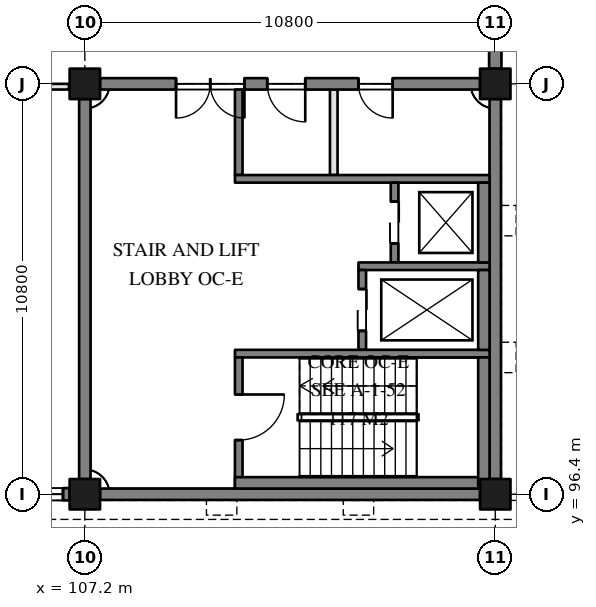
"""IFC4 building model, lengths in metres.
Left out: names, types, materials, properties, quantities, classifications, styles, units other than length and angle.
Written with IfcOpenShell. Run it as: python <this file> out.ifc"""

import sys

from ifc_helpers import new_model, si_unit, direction, frame, frame_2d, origin, origin_2d, place, context, subcontext, project, spatial, rectangle, extrude, element, fill, save


model = new_model("IFC4")
c1 = context("Model", 3, precision=1e-05, world=origin(), true_north=direction((0.0, 1.0)))
c2 = subcontext(c1, "Body", "Model", "MODEL_VIEW")
j1 = project(units=[si_unit("LENGTHUNIT", "METRE"), si_unit("PLANEANGLEUNIT", "RADIAN")], contexts=[c1])
p1 = place(None, origin())
s1 = spatial("IfcSite", under=j1, at=p1, CompositionType="ELEMENT")
p2 = place(p1, origin())
s2 = spatial("IfcBuilding", under=s1, at=p2, CompositionType="ELEMENT")
p3 = place(p2, frame((0.0, 0.0, 12.6)))
s3 = spatial("IfcBuildingStorey", under=s2, at=p3, CompositionType="ELEMENT", Elevation=12.6)
for number, where, z_axis, x_axis in (
    (1, (107.2, 96.4, 0.0), (0.0, 0.0, 1.0), (1.0, 0.0, 0.0)),
    (2, (107.2, 107.2, 0.0), (0.0, 0.0, 1.0), (1.0, 0.0, 0.0)),
    (3, (118.0, 96.4, 0.0), (0.0, 0.0, 1.0), (1.0, 0.0, 0.0)),
    (4, (118.0, 107.2, 0.0), (0.0, 0.0, 1.0), (1.0, 0.0, 0.0)),
):
    element("IfcColumn", number, at=place(p3, frame(where, z_axis=z_axis, x_axis=x_axis)), inside=s3, PredefinedType="COLUMN", context=c2, shape_type="SweptSolid", body=[
        extrude(rectangle(XDim=0.8, YDim=0.8, at=origin_2d()), origin(), (0.0, 0.0, 1.0), 3.9),
    ])
for number, where, z_axis, x_axis in (
    (5, (107.6, 96.4, 0.0), (0.0, 0.0, 1.0), (1.0, 0.0, 0.0)),
    (6, (118.0, 96.8, 0.0), (0.0, 0.0, 1.0), (0.0, 1.0, 0.0)),
):
    element("IfcWall", number, at=place(p3, frame(where, z_axis=z_axis, x_axis=x_axis)), inside=s3, PredefinedType="SOLIDWALL", context=c2, shape_type="SweptSolid", body=[
        extrude(rectangle(XDim=10.0, YDim=0.3, at=frame_2d((5.0, 0.0))), origin(), (0.0, 0.0, 1.0), 3.9),
    ])
p4 = place(p3, frame((117.6, 107.2, 0.0), z_axis=(0.0, 0.0, 1.0), x_axis=(-1.0, 0.0, 0.0)))
e7 = element("IfcWall", 7, at=p4, inside=s3, PredefinedType="SOLIDWALL", context=c2, shape_type="SweptSolid", body=[
    extrude(rectangle(XDim=10.0, YDim=0.3, at=frame_2d((5.0, 0.0))), origin(), (0.0, 0.0, 1.0), 3.9),
])
p5 = place(p4, frame((6.2, 0.0, 0.0)))
e8 = element("IfcOpeningElement", 8, at=p5, cuts=e7, PredefinedType="OPENING", context=c2, shape_type="SweptSolid", body=[
    extrude(rectangle(XDim=1.8, YDim=2.1, at=frame_2d((0.9, 1.05))), frame((0.0, 0.16, 0.0), z_axis=(0.0, -1.0, 0.0), x_axis=(1.0, 0.0, 0.0)), (0.0, 0.0, 1.0), 0.32),
])
p6 = place(p4, frame((4.6, 0.0, 0.0)))
e9 = element("IfcOpeningElement", 9, at=p6, cuts=e7, PredefinedType="OPENING", context=c2, shape_type="SweptSolid", body=[
    extrude(rectangle(XDim=1.0, YDim=2.1, at=frame_2d((0.5, 1.05))), frame((0.0, 0.16, 0.0), z_axis=(0.0, -1.0, 0.0), x_axis=(1.0, 0.0, 0.0)), (0.0, 0.0, 1.0), 0.32),
])
p7 = place(p4, frame((2.3, 0.0, 0.0)))
e10 = element("IfcOpeningElement", 10, at=p7, cuts=e7, PredefinedType="OPENING", context=c2, shape_type="SweptSolid", body=[
    extrude(rectangle(XDim=0.9, YDim=2.1, at=frame_2d((0.45, 1.05))), frame((0.0, 0.16, 0.0), z_axis=(0.0, -1.0, 0.0), x_axis=(1.0, 0.0, 0.0)), (0.0, 0.0, 1.0), 0.32),
])
p8 = place(p3, frame((107.2, 106.8, 0.0), z_axis=(0.0, 0.0, 1.0), x_axis=(0.0, -1.0, 0.0)))
e11 = element("IfcWall", 11, at=p8, inside=s3, PredefinedType="SOLIDWALL", context=c2, shape_type="SweptSolid", body=[
    extrude(rectangle(XDim=10.0, YDim=0.3, at=frame_2d((5.0, 0.0))), origin(), (0.0, 0.0, 1.0), 3.9),
])
p9 = place(p3, frame((96.8, 96.4, 0.0), z_axis=(0.0, 0.0, 1.0), x_axis=(1.0, 0.0, 0.0)))
e12 = element("IfcWall", 12, at=p9, inside=s3, PredefinedType="SOLIDWALL", context=c2, shape_type="SweptSolid", body=[
    extrude(rectangle(XDim=10.0, YDim=0.325, at=frame_2d((5.0, 0.0))), origin(), (0.0, 0.0, 1.0), 2.8),
])
p10 = place(p9, frame((0.175, 0.0, 0.5)))
e13 = element("IfcOpeningElement", 13, at=p10, cuts=e12, PredefinedType="OPENING", context=c2, shape_type="SweptSolid", body=[
    extrude(rectangle(XDim=0.95, YDim=2.25, at=frame_2d((0.475, 1.125))), frame((0.0, 0.172, 0.0), z_axis=(0.0, -1.0, 0.0), x_axis=(1.0, 0.0, 0.0)), (0.0, 0.0, 1.0), 0.345),
])
p11 = place(p9, frame((3.775, 0.0, 0.5)))
e14 = element("IfcOpeningElement", 14, at=p11, cuts=e12, PredefinedType="OPENING", context=c2, shape_type="SweptSolid", body=[
    extrude(rectangle(XDim=0.95, YDim=2.25, at=frame_2d((0.475, 1.125))), frame((0.0, 0.172, 0.0), z_axis=(0.0, -1.0, 0.0), x_axis=(1.0, 0.0, 0.0)), (0.0, 0.0, 1.0), 0.345),
])
p12 = place(p9, frame((7.375, 0.0, 0.5)))
e15 = element("IfcOpeningElement", 15, at=p12, cuts=e12, PredefinedType="OPENING", context=c2, shape_type="SweptSolid", body=[
    extrude(rectangle(XDim=0.95, YDim=2.25, at=frame_2d((0.475, 1.125))), frame((0.0, 0.172, 0.0), z_axis=(0.0, -1.0, 0.0), x_axis=(1.0, 0.0, 0.0)), (0.0, 0.0, 1.0), 0.345),
])
p13 = place(p9, frame((1.675, 0.0, 0.5)))
e16 = element("IfcOpeningElement", 16, at=p13, cuts=e12, PredefinedType="OPENING", context=c2, shape_type="SweptSolid", body=[
    extrude(rectangle(XDim=0.95, YDim=2.25, at=frame_2d((0.475, 1.125))), frame((0.0, 0.172, 0.0), z_axis=(0.0, -1.0, 0.0), x_axis=(1.0, 0.0, 0.0)), (0.0, 0.0, 1.0), 0.345),
])
p14 = place(p9, frame((5.275, 0.0, 0.5)))
e17 = element("IfcOpeningElement", 17, at=p14, cuts=e12, PredefinedType="OPENING", context=c2, shape_type="SweptSolid", body=[
    extrude(rectangle(XDim=0.95, YDim=2.25, at=frame_2d((0.475, 1.125))), frame((0.0, 0.172, 0.0), z_axis=(0.0, -1.0, 0.0), x_axis=(1.0, 0.0, 0.0)), (0.0, 0.0, 1.0), 0.345),
])
p15 = place(p9, frame((8.875, 0.0, 0.5)))
e18 = element("IfcOpeningElement", 18, at=p15, cuts=e12, PredefinedType="OPENING", context=c2, shape_type="SweptSolid", body=[
    extrude(rectangle(XDim=0.95, YDim=2.25, at=frame_2d((0.475, 1.125))), frame((0.0, 0.172, 0.0), z_axis=(0.0, -1.0, 0.0), x_axis=(1.0, 0.0, 0.0)), (0.0, 0.0, 1.0), 0.345),
])
p16 = place(p3, frame((118.0, 107.6, 0.0), z_axis=(0.0, 0.0, 1.0), x_axis=(0.0, 1.0, 0.0)))
e19 = element("IfcWall", 19, at=p16, inside=s3, PredefinedType="SOLIDWALL", context=c2, shape_type="SweptSolid", body=[
    extrude(rectangle(XDim=3.8, YDim=0.325, at=frame_2d((1.9, 0.0))), origin(), (0.0, 0.0, 1.0), 2.8),
])
p17 = place(p16, frame((0.95, 0.0, 0.7)))
e20 = element("IfcOpeningElement", 20, at=p17, cuts=e19, PredefinedType="OPENING", context=c2, shape_type="SweptSolid", body=[
    extrude(rectangle(XDim=0.9, YDim=2.0, at=frame_2d((0.45, 1.0))), frame((0.0, 0.172, 0.0), z_axis=(0.0, -1.0, 0.0), x_axis=(1.0, 0.0, 0.0)), (0.0, 0.0, 1.0), 0.345),
])
p18 = place(p3, frame((111.25, 107.05, 0.0), z_axis=(0.0, 0.0, 1.0), x_axis=(0.0, -1.0, 0.0)))
e21 = element("IfcWall", 21, at=p18, inside=s3, PredefinedType="SOLIDWALL", context=c2, shape_type="SweptSolid", body=[
    extrude(rectangle(XDim=2.25, YDim=0.2, at=frame_2d((1.125, 0.0))), origin(), (0.0, 0.0, 1.0), 3.6),
])
p19 = place(p3, frame((111.15, 104.7, 0.0), z_axis=(0.0, 0.0, 1.0), x_axis=(1.0, 0.0, 0.0)))
e22 = element("IfcWall", 22, at=p19, inside=s3, PredefinedType="SOLIDWALL", context=c2, shape_type="SweptSolid", body=[
    extrude(rectangle(XDim=6.7, YDim=0.2, at=frame_2d((3.35, 0.0))), origin(), (0.0, 0.0, 1.0), 3.6),
])
p20 = place(p3, frame((115.35, 104.6, 0.0), z_axis=(0.0, 0.0, 1.0), x_axis=(0.0, -1.0, 0.0)))
e23 = element("IfcWall", 23, at=p20, inside=s3, PredefinedType="SOLIDWALL", context=c2, shape_type="SweptSolid", body=[
    extrude(rectangle(XDim=2.1, YDim=0.2, at=frame_2d((1.05, 0.0))), origin(), (0.0, 0.0, 1.0), 3.6),
])
p21 = place(p20, frame((0.5, 0.0, 0.0)))
e24 = element("IfcOpeningElement", 24, at=p21, cuts=e23, PredefinedType="OPENING", context=c2, shape_type="SweptSolid", body=[
    extrude(rectangle(XDim=1.1, YDim=2.1, at=frame_2d((0.55, 1.05))), frame((0.0, 0.11, 0.0), z_axis=(0.0, -1.0, 0.0), x_axis=(1.0, 0.0, 0.0)), (0.0, 0.0, 1.0), 0.22),
])
p22 = place(p3, frame((114.4, 102.4, 0.0), z_axis=(0.0, 0.0, 1.0), x_axis=(1.0, 0.0, 0.0)))
e25 = element("IfcWall", 25, at=p22, inside=s3, PredefinedType="SOLIDWALL", context=c2, shape_type="SweptSolid", body=[
    extrude(rectangle(XDim=3.45, YDim=0.2, at=frame_2d((1.725, 0.0))), origin(), (0.0, 0.0, 1.0), 3.6),
])
p23 = place(p3, frame((114.5, 102.3, 0.0), z_axis=(0.0, 0.0, 1.0), x_axis=(0.0, -1.0, 0.0)))
e26 = element("IfcWall", 26, at=p23, inside=s3, PredefinedType="SOLIDWALL", context=c2, shape_type="SweptSolid", body=[
    extrude(rectangle(XDim=2.1, YDim=0.2, at=frame_2d((1.05, 0.0))), origin(), (0.0, 0.0, 1.0), 3.6),
])
p24 = place(p23, frame((0.5, 0.0, 0.0)))
e27 = element("IfcOpeningElement", 27, at=p24, cuts=e26, PredefinedType="OPENING", context=c2, shape_type="SweptSolid", body=[
    extrude(rectangle(XDim=1.1, YDim=2.1, at=frame_2d((0.55, 1.05))), frame((0.0, 0.11, 0.0), z_axis=(0.0, -1.0, 0.0), x_axis=(1.0, 0.0, 0.0)), (0.0, 0.0, 1.0), 0.22),
])
p25 = place(p3, frame((111.15, 100.1, 0.0), z_axis=(0.0, 0.0, 1.0), x_axis=(1.0, 0.0, 0.0)))
e28 = element("IfcWall", 28, at=p25, inside=s3, PredefinedType="SOLIDWALL", context=c2, shape_type="SweptSolid", body=[
    extrude(rectangle(XDim=6.7, YDim=0.2, at=frame_2d((3.35, 0.0))), origin(), (0.0, 0.0, 1.0), 3.6),
])
p26 = place(p3, frame((111.25, 100.0, 0.0), z_axis=(0.0, 0.0, 1.0), x_axis=(0.0, -1.0, 0.0)))
e29 = element("IfcWall", 29, at=p26, inside=s3, PredefinedType="SOLIDWALL", context=c2, shape_type="SweptSolid", body=[
    extrude(rectangle(XDim=3.45, YDim=0.2, at=frame_2d((1.725, 0.0))), origin(), (0.0, 0.0, 1.0), 3.6),
])
p27 = place(p26, frame((0.975, 0.0, 0.0)))
e30 = element("IfcOpeningElement", 30, at=p27, cuts=e29, PredefinedType="OPENING", context=c2, shape_type="SweptSolid", body=[
    extrude(rectangle(XDim=1.2, YDim=2.1, at=frame_2d((0.6, 1.05))), frame((0.0, 0.11, 0.0), z_axis=(0.0, -1.0, 0.0), x_axis=(1.0, 0.0, 0.0)), (0.0, 0.0, 1.0), 0.22),
])
p28 = place(p3, frame((111.15, 96.7, -0.3), z_axis=(0.0, 0.0, 1.0), x_axis=(1.0, 0.0, 0.0)))
e31 = element("IfcWall", 31, at=p28, inside=s3, PredefinedType="SOLIDWALL", context=c2, shape_type="SweptSolid", body=[
    extrude(rectangle(XDim=6.7, YDim=0.3, at=frame_2d((3.35, 0.0))), origin(), (0.0, 0.0, 1.0), 3.9),
])
p29 = place(p3, frame((117.7, 100.0, -0.3), z_axis=(0.0, 0.0, 1.0), x_axis=(0.0, -1.0, 0.0)))
e32 = element("IfcWall", 32, at=p29, inside=s3, PredefinedType="SOLIDWALL", context=c2, shape_type="SweptSolid", body=[
    extrude(rectangle(XDim=3.45, YDim=0.3, at=frame_2d((1.725, 0.0))), origin(), (0.0, 0.0, 1.0), 3.9),
])
for number, where, z_axis, x_axis in (
    (33, (117.7, 104.6, -0.3), (0.0, 0.0, 1.0), (0.0, -1.0, 0.0)),
    (34, (117.7, 102.3, -0.3), (0.0, 0.0, 1.0), (0.0, -1.0, 0.0)),
):
    element("IfcWall", number, at=place(p3, frame(where, z_axis=z_axis, x_axis=x_axis)), inside=s3, PredefinedType="SOLIDWALL", context=c2, shape_type="SweptSolid", body=[
        extrude(rectangle(XDim=2.1, YDim=0.3, at=frame_2d((1.05, 0.0))), origin(), (0.0, 0.0, 1.0), 3.9),
    ])
p30 = place(p3, frame((113.75, 107.05, 0.0), z_axis=(0.0, 0.0, 1.0), x_axis=(0.0, -1.0, 0.0)))
e35 = element("IfcWall", 35, at=p30, inside=s3, PredefinedType="PARTITIONING", context=c2, shape_type="SweptSolid", body=[
    extrude(rectangle(XDim=2.25, YDim=0.2, at=frame_2d((1.125, 0.0))), origin(), (0.0, 0.0, 1.0), 3.6),
])
p31 = place(p3, frame((96.82, 107.125, 0.0), z_axis=(0.0, 0.0, 1.0), x_axis=(1.0, 0.0, 0.0)))
e36 = element("IfcWall", 36, at=p31, inside=s3, PredefinedType="PARTITIONING", context=c2, shape_type="SweptSolid", body=[
    extrude(rectangle(XDim=9.96, YDim=0.15, at=frame_2d((4.98, 0.0))), origin(), (0.0, 0.0, 1.0), 2.8),
])
p32 = place(p15, origin())
e37 = element("IfcWindow", 37, at=p32, inside=s3, PartitioningType="SINGLE_PANEL", PredefinedType="WINDOW", context=c2, shape_type="SweptSolid", body=[
    extrude(rectangle(XDim=0.95, YDim=2.25, at=frame_2d((0.475, 1.125))), frame((0.0, 0.03, 0.0), z_axis=(0.0, -1.0, 0.0), x_axis=(1.0, 0.0, 0.0)), (0.0, 0.0, 1.0), 0.06),
])
fill(e18, e37)
p33 = place(p21, frame((1.1, 0.0, 0.0), z_axis=(0.0, 0.0, 1.0), x_axis=(-1.0, 0.0, 0.0)))
e38 = element("IfcDoor", 38, at=p33, inside=s3, OperationType="DOUBLE_DOOR_SLIDING", PredefinedType="DOOR", context=c2, shape_type="SweptSolid", body=[
    extrude(rectangle(XDim=1.1, YDim=2.1, at=frame_2d((0.55, 1.05))), frame((0.0, 0.025, 0.0), z_axis=(0.0, -1.0, 0.0), x_axis=(1.0, 0.0, 0.0)), (0.0, 0.0, 1.0), 0.05),
])
fill(e24, e38)
p34 = place(p24, frame((1.1, 0.0, 0.0), z_axis=(0.0, 0.0, 1.0), x_axis=(-1.0, 0.0, 0.0)))
e39 = element("IfcDoor", 39, at=p34, inside=s3, OperationType="DOUBLE_DOOR_SLIDING", PredefinedType="DOOR", context=c2, shape_type="SweptSolid", body=[
    extrude(rectangle(XDim=1.1, YDim=2.1, at=frame_2d((0.55, 1.05))), frame((0.0, 0.025, 0.0), z_axis=(0.0, -1.0, 0.0), x_axis=(1.0, 0.0, 0.0)), (0.0, 0.0, 1.0), 0.05),
])
fill(e27, e39)
p35 = place(p27, frame((1.2, 0.0, 0.0), z_axis=(0.0, 0.0, 1.0), x_axis=(-1.0, 0.0, 0.0)))
e40 = element("IfcDoor", 40, at=p35, inside=s3, OperationType="SINGLE_SWING_RIGHT", PredefinedType="DOOR", context=c2, shape_type="SweptSolid", body=[
    extrude(rectangle(XDim=1.2, YDim=2.1, at=frame_2d((0.6, 1.05))), frame((0.0, 0.025, 0.0), z_axis=(0.0, -1.0, 0.0), x_axis=(1.0, 0.0, 0.0)), (0.0, 0.0, 1.0), 0.05),
])
fill(e30, e40)
p36 = place(p5, frame((1.8, 0.0, 0.0), z_axis=(0.0, 0.0, 1.0), x_axis=(-1.0, 0.0, 0.0)))
e41 = element("IfcDoor", 41, at=p36, inside=s3, OperationType="DOUBLE_DOOR_DOUBLE_SWING", PredefinedType="DOOR", context=c2, shape_type="SweptSolid", body=[
    extrude(rectangle(XDim=1.8, YDim=2.1, at=frame_2d((0.9, 1.05))), frame((0.0, 0.025, 0.0), z_axis=(0.0, -1.0, 0.0), x_axis=(1.0, 0.0, 0.0)), (0.0, 0.0, 1.0), 0.05),
])
fill(e8, e41)
p37 = place(p6, origin())
e42 = element("IfcDoor", 42, at=p37, inside=s3, OperationType="SINGLE_SWING_RIGHT", PredefinedType="DOOR", context=c2, shape_type="SweptSolid", body=[
    extrude(rectangle(XDim=1.0, YDim=2.1, at=frame_2d((0.5, 1.05))), frame((0.0, 0.025, 0.0), z_axis=(0.0, -1.0, 0.0), x_axis=(1.0, 0.0, 0.0)), (0.0, 0.0, 1.0), 0.05),
])
fill(e9, e42)
p38 = place(p7, origin())
e43 = element("IfcDoor", 43, at=p38, inside=s3, OperationType="SINGLE_SWING_LEFT", PredefinedType="DOOR", context=c2, shape_type="SweptSolid", body=[
    extrude(rectangle(XDim=0.9, YDim=2.1, at=frame_2d((0.45, 1.05))), frame((0.0, 0.025, 0.0), z_axis=(0.0, -1.0, 0.0), x_axis=(1.0, 0.0, 0.0)), (0.0, 0.0, 1.0), 0.05),
])
fill(e10, e43)
save(model, sys.argv[1])
